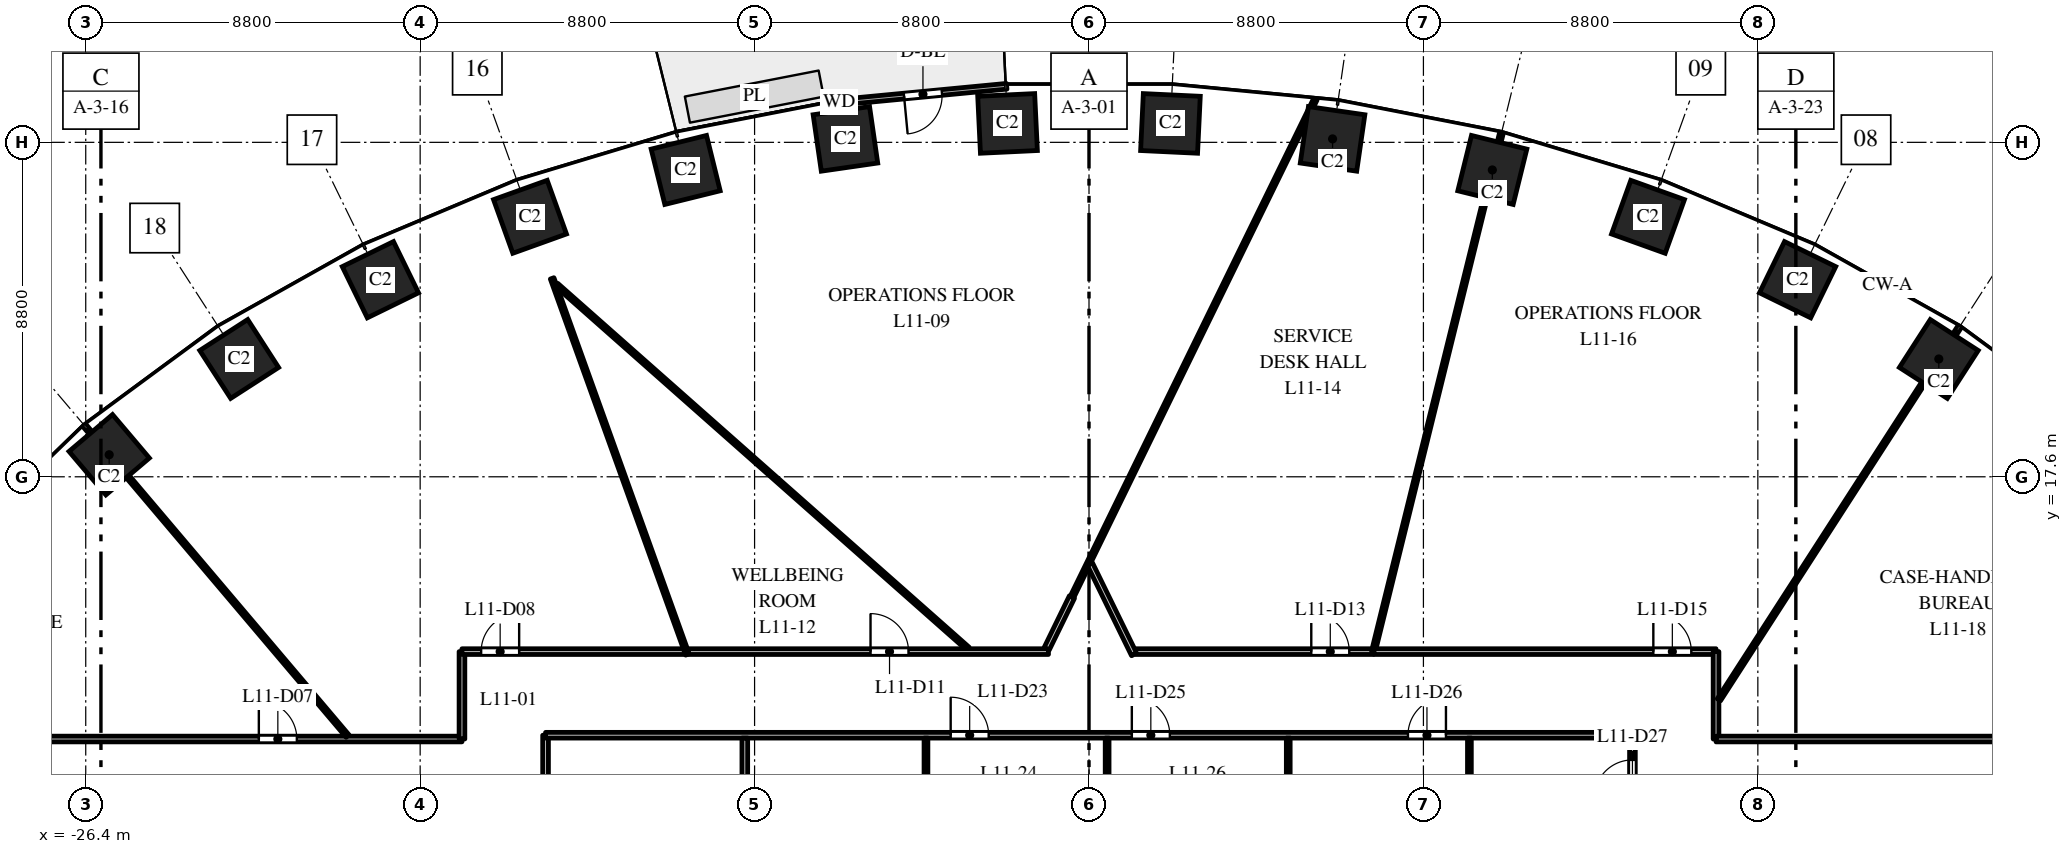
"""IFC4 building model, lengths in metres.
Left out: names, types, materials, properties, quantities, classifications, styles, units other than length and angle.
Written with IfcOpenShell. Run it as: python <this file> out.ifc"""

import sys

from ifc_helpers import new_model, si_unit, direction, frame, frame_2d, origin, origin_2d, place, context, subcontext, project, spatial, rectangle, extrude, element, fill, save


model = new_model("IFC4")
c1 = context("Model", 3, precision=1e-05, world=origin(), true_north=direction((0.0, 1.0)))
c2 = subcontext(c1, "Body", "Model", "MODEL_VIEW")
j1 = project(units=[si_unit("LENGTHUNIT", "METRE"), si_unit("PLANEANGLEUNIT", "RADIAN")], contexts=[c1])
p1 = place(None, origin())
s1 = spatial("IfcSite", under=j1, at=p1, CompositionType="ELEMENT")
p2 = place(p1, origin())
s2 = spatial("IfcBuilding", under=s1, at=p2, CompositionType="ELEMENT")
p3 = place(p2, frame((0.0, 0.0, 54.5)))
s3 = spatial("IfcBuildingStorey", under=s2, at=p3, CompositionType="ELEMENT", Elevation=54.5)
for number, where, z_axis, x_axis in (
    (1, (22.362, 20.7, 0.0), (0.0, 0.0, 1.0), (-0.84, 0.542, 0.0)),
    (2, (18.646, 22.785, 0.0), (0.0, 0.0, 1.0), (-0.898, 0.439, 0.0)),
    (3, (14.709, 24.441, 0.0), (0.0, 0.0, 1.0), (-0.941, 0.338, 0.0)),
    (4, (10.613, 25.674, 0.0), (0.0, 0.0, 1.0), (-0.971, 0.24, 0.0)),
    (5, (6.409, 26.491, 0.0), (0.0, 0.0, 1.0), (-0.99, 0.143, 0.0)),
    (6, (2.143, 26.898, 0.0), (0.0, 0.0, 1.0), (-0.999, 0.048, 0.0)),
    (7, (-2.143, 26.898, 0.0), (0.0, 0.0, 1.0), (-0.999, -0.048, 0.0)),
    (8, (-6.409, 26.491, 0.0), (0.0, 0.0, 1.0), (-0.99, -0.143, 0.0)),
    (9, (-10.613, 25.674, 0.0), (0.0, 0.0, 1.0), (-0.971, -0.24, 0.0)),
    (10, (-14.709, 24.441, 0.0), (0.0, 0.0, 1.0), (-0.941, -0.338, 0.0)),
    (11, (-18.646, 22.785, 0.0), (0.0, 0.0, 1.0), (-0.898, -0.439, 0.0)),
    (12, (-22.362, 20.7, 0.0), (0.0, 0.0, 1.0), (-0.84, -0.542, 0.0)),
    (13, (-25.783, 18.18, 0.0), (0.0, 0.0, 1.0), (-0.763, -0.646, 0.0)),
):
    element("IfcColumn", number, at=place(p3, frame(where, z_axis=z_axis, x_axis=x_axis)), inside=s3, PredefinedType="COLUMN", context=c2, shape_type="SweptSolid", body=[
        extrude(rectangle(XDim=1.5, YDim=1.5, at=origin_2d()), origin(), (0.0, 0.0, 1.0), 4.0),
    ])
p4 = place(p3, frame((-2.166, 27.875, 0.0), z_axis=(0.0, 0.0, 1.0), x_axis=(-0.995473879823, -0.095035543824, 0.0)))
e14 = element("IfcWall", 14, at=p4, inside=s3, PredefinedType="STANDARD", context=c2, shape_type="SweptSolid", body=[
    extrude(rectangle(XDim=4.426, YDim=0.15, at=frame_2d((2.213, 0.0))), origin(), (0.0, 0.0, 1.0), 3.7),
])
p5 = place(p4, frame((1.713, 0.0, 0.0)))
e15 = element("IfcOpeningElement", 15, at=p5, cuts=e14, PredefinedType="OPENING", context=c2, shape_type="SweptSolid", body=[
    extrude(rectangle(XDim=1.0, YDim=2.4, at=frame_2d((0.5, 1.2))), frame((0.0, 0.085, 0.0), z_axis=(0.0, -1.0, 0.0), x_axis=(1.0, 0.0, 0.0)), (0.0, 0.0, 1.0), 0.17),
])
p6 = place(p3, frame((-31.5, 10.7, 0.0), z_axis=(0.0, 0.0, 1.0), x_axis=(1.0, 0.0, 0.0)))
e16 = element("IfcWall", 16, at=p6, inside=s3, PredefinedType="PARTITIONING", context=c2, shape_type="SweptSolid", body=[
    extrude(rectangle(XDim=15.0, YDim=0.15, at=frame_2d((7.5, 0.0))), origin(), (0.0, 0.0, 1.0), 3.1),
])
p7 = place(p6, frame((9.655, 0.0, 0.0)))
e17 = element("IfcOpeningElement", 17, at=p7, cuts=e16, PredefinedType="OPENING", context=c2, shape_type="SweptSolid", body=[
    extrude(rectangle(XDim=1.0, YDim=2.1, at=frame_2d((0.5, 1.05))), frame((0.0, 0.085, 0.0), z_axis=(0.0, -1.0, 0.0), x_axis=(1.0, 0.0, 0.0)), (0.0, 0.0, 1.0), 0.17),
])
p8 = place(p3, frame((-26.43, 18.945, 0.0), z_axis=(0.0, 0.0, 1.0), x_axis=(0.646400187952, -0.762998556365, 0.0)))
e18 = element("IfcWall", 18, at=p8, inside=s3, PredefinedType="PARTITIONING", context=c2, shape_type="SweptSolid", body=[
    extrude(rectangle(XDim=10.704, YDim=0.1, at=frame_2d((5.352, 0.0))), origin(), (0.0, 0.0, 1.0), 3.7),
])
p9 = place(p3, frame((-16.5, 10.7, 0.0), z_axis=(0.0, 0.0, 1.0), x_axis=(0.0, 1.0, 0.0)))
e19 = element("IfcWall", 19, at=p9, inside=s3, PredefinedType="PARTITIONING", context=c2, shape_type="SweptSolid", body=[
    extrude(rectangle(XDim=2.3, YDim=0.15, at=frame_2d((1.15, 0.0))), origin(), (0.0, 0.0, 1.0), 2.75),
])
p10 = place(p3, frame((-16.5, 13.0, 0.0), z_axis=(0.0, 0.0, 1.0), x_axis=(1.0, 0.0, 0.0)))
e20 = element("IfcWall", 20, at=p10, inside=s3, PredefinedType="PARTITIONING", context=c2, shape_type="SweptSolid", body=[
    extrude(rectangle(XDim=5.893, YDim=0.15, at=frame_2d((2.947, 0.0))), origin(), (0.0, 0.0, 1.0), 2.85),
])
p11 = place(p10, frame((0.505, 0.0, 0.0)))
e21 = element("IfcOpeningElement", 21, at=p11, cuts=e20, PredefinedType="OPENING", context=c2, shape_type="SweptSolid", body=[
    extrude(rectangle(XDim=1.0, YDim=2.1, at=frame_2d((0.5, 1.05))), frame((0.0, 0.085, 0.0), z_axis=(0.0, -1.0, 0.0), x_axis=(1.0, 0.0, 0.0)), (0.0, 0.0, 1.0), 0.17),
])
p12 = place(p3, frame((-14.3, -10.8, 0.0), z_axis=(0.0, 0.0, 1.0), x_axis=(0.0, 1.0, 0.0)))
e22 = element("IfcWall", 22, at=p12, inside=s3, PredefinedType="PARTITIONING", context=c2, shape_type="SweptSolid", body=[
    extrude(rectangle(XDim=21.6, YDim=0.15, at=frame_2d((10.8, 0.0))), origin(), (0.0, 0.0, 1.0), 2.75),
])
p13 = place(p12, frame((0.65, 0.0, 0.0)))
e23 = element("IfcOpeningElement", 23, at=p13, cuts=e22, PredefinedType="OPENING", context=c2, shape_type="SweptSolid", body=[
    extrude(rectangle(XDim=1.0, YDim=2.1, at=frame_2d((0.5, 1.05))), frame((0.0, 0.085, 0.0), z_axis=(0.0, -1.0, 0.0), x_axis=(1.0, 0.0, 0.0)), (0.0, 0.0, 1.0), 0.17),
])
p14 = place(p3, frame((-14.3, 10.8, 0.0), z_axis=(0.0, 0.0, 1.0), x_axis=(1.0, 0.0, 0.0)))
e24 = element("IfcWall", 24, at=p14, inside=s3, PredefinedType="PARTITIONING", context=c2, shape_type="SweptSolid", body=[
    extrude(rectangle(XDim=28.6, YDim=0.15, at=frame_2d((14.3, 0.0))), origin(), (0.0, 0.0, 1.0), 2.85),
])
p15 = place(p14, frame((10.66, 0.0, 0.0)))
e25 = element("IfcOpeningElement", 25, at=p15, cuts=e24, PredefinedType="OPENING", context=c2, shape_type="SweptSolid", body=[
    extrude(rectangle(XDim=1.0, YDim=2.1, at=frame_2d((0.5, 1.05))), frame((0.0, 0.085, 0.0), z_axis=(0.0, -1.0, 0.0), x_axis=(1.0, 0.0, 0.0)), (0.0, 0.0, 1.0), 0.17),
])
p16 = place(p14, frame((15.427, 0.0, 0.0)))
e26 = element("IfcOpeningElement", 26, at=p16, cuts=e24, PredefinedType="OPENING", context=c2, shape_type="SweptSolid", body=[
    extrude(rectangle(XDim=1.0, YDim=2.1, at=frame_2d((0.5, 1.05))), frame((0.0, 0.085, 0.0), z_axis=(0.0, -1.0, 0.0), x_axis=(1.0, 0.0, 0.0)), (0.0, 0.0, 1.0), 0.17),
])
p17 = place(p14, frame((22.693, 0.0, 0.0)))
e27 = element("IfcOpeningElement", 27, at=p17, cuts=e24, PredefinedType="OPENING", context=c2, shape_type="SweptSolid", body=[
    extrude(rectangle(XDim=1.0, YDim=2.1, at=frame_2d((0.5, 1.05))), frame((0.0, 0.085, 0.0), z_axis=(0.0, -1.0, 0.0), x_axis=(1.0, 0.0, 0.0)), (0.0, 0.0, 1.0), 0.17),
])
p18 = place(p3, frame((-14.127, 22.821, 0.0), z_axis=(0.0, 0.0, 1.0), x_axis=(0.338406243201, -0.941000114008, 0.0)))
e28 = element("IfcWall", 28, at=p18, inside=s3, PredefinedType="PARTITIONING", context=c2, shape_type="SweptSolid", body=[
    extrude(rectangle(XDim=10.516, YDim=0.1, at=frame_2d((5.258, 0.0))), origin(), (0.0, 0.0, 1.0), 2.85),
])
p19 = place(p3, frame((-14.014, 22.654, 0.0), z_axis=(0.0, 0.0, 1.0), x_axis=(0.749047176019, -0.662516662506, 0.0)))
e29 = element("IfcWall", 29, at=p19, inside=s3, PredefinedType="PARTITIONING", context=c2, shape_type="SweptSolid", body=[
    extrude(rectangle(XDim=14.454, YDim=0.1, at=frame_2d((7.227, 0.0))), origin(), (0.0, 0.0, 1.0), 2.85),
])
p20 = place(p3, frame((-10.542, 13.0, 0.0), z_axis=(0.0, 0.0, 1.0), x_axis=(1.0, 0.0, 0.0)))
e30 = element("IfcWall", 30, at=p20, inside=s3, PredefinedType="PARTITIONING", context=c2, shape_type="SweptSolid", body=[
    extrude(rectangle(XDim=9.475, YDim=0.15, at=frame_2d((4.738, 0.0))), origin(), (0.0, 0.0, 1.0), 2.85),
])
p21 = place(p20, frame((4.793, 0.0, 0.0)))
e31 = element("IfcOpeningElement", 31, at=p21, cuts=e30, PredefinedType="OPENING", context=c2, shape_type="SweptSolid", body=[
    extrude(rectangle(XDim=1.0, YDim=2.1, at=frame_2d((0.5, 1.05))), frame((0.0, 0.085, 0.0), z_axis=(0.0, -1.0, 0.0), x_axis=(1.0, 0.0, 0.0)), (0.0, 0.0, 1.0), 0.17),
])
p22 = place(p3, frame((-9.057, 0.045, 0.0), z_axis=(0.0, 0.0, 1.0), x_axis=(0.0, 1.0, 0.0)))
e32 = element("IfcWall", 32, at=p22, inside=s3, PredefinedType="PARTITIONING", context=c2, shape_type="SweptSolid", body=[
    extrude(rectangle(XDim=10.68, YDim=0.15, at=frame_2d((5.34, 0.0))), origin(), (0.0, 0.0, 1.0), 2.75),
])
p23 = place(p22, frame((4.61, 0.0, 0.0)))
e33 = element("IfcOpeningElement", 33, at=p23, cuts=e32, PredefinedType="OPENING", context=c2, shape_type="SweptSolid", body=[
    extrude(rectangle(XDim=1.0, YDim=2.1, at=frame_2d((0.5, 1.05))), frame((0.0, 0.085, 0.0), z_axis=(0.0, -1.0, 0.0), x_axis=(1.0, 0.0, 0.0)), (0.0, 0.0, 1.0), 0.17),
])
p24 = place(p3, frame((-4.29, 6.568, 0.0), z_axis=(0.0, 0.0, 1.0), x_axis=(0.0, 1.0, 0.0)))
e34 = element("IfcWall", 34, at=p24, inside=s3, PredefinedType="PARTITIONING", context=c2, shape_type="SweptSolid", body=[
    extrude(rectangle(XDim=4.157, YDim=0.1, at=frame_2d((2.079, 0.0))), origin(), (0.0, 0.0, 1.0), 2.85),
])
p25 = place(p3, frame((-1.113, 13.075, 0.0), z_axis=(0.0, 0.0, 1.0), x_axis=(0.438741402857, 0.898613365925, 0.0)))
e35 = element("IfcWall", 35, at=p25, inside=s3, PredefinedType="PARTITIONING", context=c2, shape_type="SweptSolid", body=[
    extrude(rectangle(XDim=1.514, YDim=0.15, at=frame_2d((0.757, 0.0))), origin(), (0.0, 0.0, 1.0), 2.85),
])
p26 = place(p3, frame((-0.444, 14.444, 0.0), z_axis=(0.0, 0.0, 1.0), x_axis=(0.439242877898, 0.898368351077, 0.0)))
e36 = element("IfcWall", 36, at=p26, inside=s3, PredefinedType="PARTITIONING", context=c2, shape_type="SweptSolid", body=[
    extrude(rectangle(XDim=14.575, YDim=0.1, at=frame_2d((7.288, 0.0))), origin(), (0.0, 0.0, 1.0), 2.85),
])
p27 = place(p3, frame((0.022, 15.308, 0.0), z_axis=(0.0, 0.0, 1.0), x_axis=(0.439206830508, -0.898385974977, 0.0)))
e37 = element("IfcWall", 37, at=p27, inside=s3, PredefinedType="PARTITIONING", context=c2, shape_type="SweptSolid", body=[
    extrude(rectangle(XDim=2.653, YDim=0.15, at=frame_2d((1.326, 0.0))), origin(), (0.0, 0.0, 1.0), 3.7),
])
p28 = place(p3, frame((0.477, 7.468, 0.0), z_axis=(0.0, 0.0, 1.0), x_axis=(0.0, 1.0, 0.0)))
e38 = element("IfcWall", 38, at=p28, inside=s3, PredefinedType="PARTITIONING", context=c2, shape_type="SweptSolid", body=[
    extrude(rectangle(XDim=3.257, YDim=0.1, at=frame_2d((1.628, 0.0))), origin(), (0.0, 0.0, 1.0), 2.85),
])
p29 = place(p3, frame((1.233, 13.0, 0.0), z_axis=(0.0, 0.0, 1.0), x_axis=(1.0, 0.0, 0.0)))
e39 = element("IfcWall", 39, at=p29, inside=s3, PredefinedType="PARTITIONING", context=c2, shape_type="SweptSolid", body=[
    extrude(rectangle(XDim=6.25, YDim=0.15, at=frame_2d((3.125, 0.0))), origin(), (0.0, 0.0, 1.0), 2.85),
])
p30 = place(p29, frame((4.616, 0.0, 0.0)))
e40 = element("IfcOpeningElement", 40, at=p30, cuts=e39, PredefinedType="OPENING", context=c2, shape_type="SweptSolid", body=[
    extrude(rectangle(XDim=1.0, YDim=2.1, at=frame_2d((0.5, 1.05))), frame((0.0, 0.085, 0.0), z_axis=(0.0, -1.0, 0.0), x_axis=(1.0, 0.0, 0.0)), (0.0, 0.0, 1.0), 0.17),
])
p31 = place(p3, frame((5.243, 6.059, 0.0), z_axis=(0.0, 0.0, 1.0), x_axis=(0.0, 1.0, 0.0)))
e41 = element("IfcWall", 41, at=p31, inside=s3, PredefinedType="PARTITIONING", context=c2, shape_type="SweptSolid", body=[
    extrude(rectangle(XDim=4.666, YDim=0.1, at=frame_2d((2.333, 0.0))), origin(), (0.0, 0.0, 1.0), 2.85),
])
p32 = place(p3, frame((7.483, 13.0, 0.0), z_axis=(0.0, 0.0, 1.0), x_axis=(0.239763745499, 0.97083126564, 0.0)))
e42 = element("IfcWall", 42, at=p32, inside=s3, PredefinedType="PARTITIONING", context=c2, shape_type="SweptSolid", body=[
    extrude(rectangle(XDim=14.056, YDim=0.1, at=frame_2d((7.028, 0.0))), origin(), (0.0, 0.0, 1.0), 2.85),
])
p33 = place(p3, frame((7.499, 13.0, 0.0), z_axis=(0.0, 0.0, 1.0), x_axis=(1.0, 0.0, 0.0)))
e43 = element("IfcWall", 43, at=p33, inside=s3, PredefinedType="PARTITIONING", context=c2, shape_type="SweptSolid", body=[
    extrude(rectangle(XDim=9.001, YDim=0.15, at=frame_2d((4.5, 0.0))), origin(), (0.0, 0.0, 1.0), 2.85),
])
p34 = place(p33, frame((7.351, 0.0, 0.0)))
e44 = element("IfcOpeningElement", 44, at=p34, cuts=e43, PredefinedType="OPENING", context=c2, shape_type="SweptSolid", body=[
    extrude(rectangle(XDim=1.0, YDim=2.1, at=frame_2d((0.5, 1.05))), frame((0.0, 0.085, 0.0), z_axis=(0.0, -1.0, 0.0), x_axis=(1.0, 0.0, 0.0)), (0.0, 0.0, 1.0), 0.17),
])
p35 = place(p3, frame((10.01, -10.725, 0.0), z_axis=(0.0, 0.0, 1.0), x_axis=(0.0, 1.0, 0.0)))
e45 = element("IfcWall", 45, at=p35, inside=s3, PredefinedType="PARTITIONING", context=c2, shape_type="SweptSolid", body=[
    extrude(rectangle(XDim=21.45, YDim=0.1, at=frame_2d((10.725, 0.0))), origin(), (0.0, 0.0, 1.0), 2.75),
])
p36 = place(p3, frame((14.3, -10.8, 0.0), z_axis=(0.0, 0.0, 1.0), x_axis=(0.0, 1.0, 0.0)))
e46 = element("IfcWall", 46, at=p36, inside=s3, PredefinedType="PARTITIONING", context=c2, shape_type="SweptSolid", body=[
    extrude(rectangle(XDim=21.6, YDim=0.15, at=frame_2d((10.8, 0.0))), origin(), (0.0, 0.0, 1.0), 2.75),
])
p37 = place(p36, frame((19.95, 0.0, 0.0)))
e47 = element("IfcOpeningElement", 47, at=p37, cuts=e46, PredefinedType="OPENING", context=c2, shape_type="SweptSolid", body=[
    extrude(rectangle(XDim=1.0, YDim=2.1, at=frame_2d((0.5, 1.05))), frame((0.0, 0.085, 0.0), z_axis=(0.0, -1.0, 0.0), x_axis=(1.0, 0.0, 0.0)), (0.0, 0.0, 1.0), 0.17),
])
p38 = place(p3, frame((16.5, 10.7, 0.0), z_axis=(0.0, 0.0, 1.0), x_axis=(0.0, 1.0, 0.0)))
e48 = element("IfcWall", 48, at=p38, inside=s3, PredefinedType="PARTITIONING", context=c2, shape_type="SweptSolid", body=[
    extrude(rectangle(XDim=2.3, YDim=0.15, at=frame_2d((1.15, 0.0))), origin(), (0.0, 0.0, 1.0), 3.7),
])
p39 = place(p3, frame((16.5, 10.7, 0.0), z_axis=(0.0, 0.0, 1.0), x_axis=(1.0, 0.0, 0.0)))
e49 = element("IfcWall", 49, at=p39, inside=s3, PredefinedType="PARTITIONING", context=c2, shape_type="SweptSolid", body=[
    extrude(rectangle(XDim=15.0, YDim=0.15, at=frame_2d((7.5, 0.0))), origin(), (0.0, 0.0, 1.0), 2.75),
])
p40 = place(p39, frame((11.371, 0.0, 0.0)))
e50 = element("IfcOpeningElement", 50, at=p40, cuts=e49, PredefinedType="OPENING", context=c2, shape_type="SweptSolid", body=[
    extrude(rectangle(XDim=1.0, YDim=2.1, at=frame_2d((0.5, 1.05))), frame((0.0, 0.085, 0.0), z_axis=(0.0, -1.0, 0.0), x_axis=(1.0, 0.0, 0.0)), (0.0, 0.0, 1.0), 0.17),
])
p41 = place(p3, frame((16.575, 11.733, 0.0), z_axis=(0.0, 0.0, 1.0), x_axis=(0.54222594427, 0.840232720953, 0.0)))
e51 = element("IfcWall", 51, at=p41, inside=s3, PredefinedType="PARTITIONING", context=c2, shape_type="SweptSolid", body=[
    extrude(rectangle(XDim=11.674, YDim=0.1, at=frame_2d((5.837, 0.0))), origin(), (0.0, 0.0, 1.0), 3.7),
])
p42 = place(p5, origin())
e52 = element("IfcDoor", 52, at=p42, inside=s3, OperationType="SINGLE_SWING_RIGHT", PredefinedType="DOOR", context=c2, shape_type="SweptSolid", body=[
    extrude(rectangle(XDim=1.0, YDim=2.4, at=frame_2d((0.5, 1.2))), frame((0.0, 0.025, 0.0), z_axis=(0.0, -1.0, 0.0), x_axis=(1.0, 0.0, 0.0)), (0.0, 0.0, 1.0), 0.05),
])
fill(e15, e52)
p43 = place(p7, origin())
e53 = element("IfcDoor", 53, at=p43, inside=s3, OperationType="SINGLE_SWING_LEFT", PredefinedType="DOOR", context=c2, shape_type="SweptSolid", body=[
    extrude(rectangle(XDim=1.0, YDim=2.1, at=frame_2d((0.5, 1.05))), frame((0.0, 0.025, 0.0), z_axis=(0.0, -1.0, 0.0), x_axis=(1.0, 0.0, 0.0)), (0.0, 0.0, 1.0), 0.05),
])
fill(e17, e53)
p44 = place(p11, origin())
e54 = element("IfcDoor", 54, at=p44, inside=s3, OperationType="SINGLE_SWING_RIGHT", PredefinedType="DOOR", context=c2, shape_type="SweptSolid", body=[
    extrude(rectangle(XDim=1.0, YDim=2.1, at=frame_2d((0.5, 1.05))), frame((0.0, 0.025, 0.0), z_axis=(0.0, -1.0, 0.0), x_axis=(1.0, 0.0, 0.0)), (0.0, 0.0, 1.0), 0.05),
])
fill(e21, e54)
p45 = place(p21, origin())
e55 = element("IfcDoor", 55, at=p45, inside=s3, OperationType="SINGLE_SWING_LEFT", PredefinedType="DOOR", context=c2, shape_type="SweptSolid", body=[
    extrude(rectangle(XDim=1.0, YDim=2.1, at=frame_2d((0.5, 1.05))), frame((0.0, 0.025, 0.0), z_axis=(0.0, -1.0, 0.0), x_axis=(1.0, 0.0, 0.0)), (0.0, 0.0, 1.0), 0.05),
])
fill(e31, e55)
p46 = place(p30, origin())
e56 = element("IfcDoor", 56, at=p46, inside=s3, OperationType="SINGLE_SWING_LEFT", PredefinedType="DOOR", context=c2, shape_type="SweptSolid", body=[
    extrude(rectangle(XDim=1.0, YDim=2.1, at=frame_2d((0.5, 1.05))), frame((0.0, 0.025, 0.0), z_axis=(0.0, -1.0, 0.0), x_axis=(1.0, 0.0, 0.0)), (0.0, 0.0, 1.0), 0.05),
])
fill(e40, e56)
p47 = place(p34, origin())
e57 = element("IfcDoor", 57, at=p47, inside=s3, OperationType="SINGLE_SWING_LEFT", PredefinedType="DOOR", context=c2, shape_type="SweptSolid", body=[
    extrude(rectangle(XDim=1.0, YDim=2.1, at=frame_2d((0.5, 1.05))), frame((0.0, 0.025, 0.0), z_axis=(0.0, -1.0, 0.0), x_axis=(1.0, 0.0, 0.0)), (0.0, 0.0, 1.0), 0.05),
])
fill(e44, e57)
p48 = place(p15, origin())
e58 = element("IfcDoor", 58, at=p48, inside=s3, OperationType="SINGLE_SWING_LEFT", PredefinedType="DOOR", context=c2, shape_type="SweptSolid", body=[
    extrude(rectangle(XDim=1.0, YDim=2.1, at=frame_2d((0.5, 1.05))), frame((0.0, 0.025, 0.0), z_axis=(0.0, -1.0, 0.0), x_axis=(1.0, 0.0, 0.0)), (0.0, 0.0, 1.0), 0.05),
])
fill(e25, e58)
p49 = place(p16, origin())
e59 = element("IfcDoor", 59, at=p49, inside=s3, OperationType="SINGLE_SWING_LEFT", PredefinedType="DOOR", context=c2, shape_type="SweptSolid", body=[
    extrude(rectangle(XDim=1.0, YDim=2.1, at=frame_2d((0.5, 1.05))), frame((0.0, 0.025, 0.0), z_axis=(0.0, -1.0, 0.0), x_axis=(1.0, 0.0, 0.0)), (0.0, 0.0, 1.0), 0.05),
])
fill(e26, e59)
p50 = place(p17, origin())
e60 = element("IfcDoor", 60, at=p50, inside=s3, OperationType="SINGLE_SWING_RIGHT", PredefinedType="DOOR", context=c2, shape_type="SweptSolid", body=[
    extrude(rectangle(XDim=1.0, YDim=2.1, at=frame_2d((0.5, 1.05))), frame((0.0, 0.025, 0.0), z_axis=(0.0, -1.0, 0.0), x_axis=(1.0, 0.0, 0.0)), (0.0, 0.0, 1.0), 0.05),
])
fill(e27, e60)
p51 = place(p37, origin())
e61 = element("IfcDoor", 61, at=p51, inside=s3, OperationType="SINGLE_SWING_LEFT", PredefinedType="DOOR", context=c2, shape_type="SweptSolid", body=[
    extrude(rectangle(XDim=1.0, YDim=2.1, at=frame_2d((0.5, 1.05))), frame((0.0, 0.025, 0.0), z_axis=(0.0, -1.0, 0.0), x_axis=(1.0, 0.0, 0.0)), (0.0, 0.0, 1.0), 0.05),
])
fill(e47, e61)
save(model, sys.argv[1])
